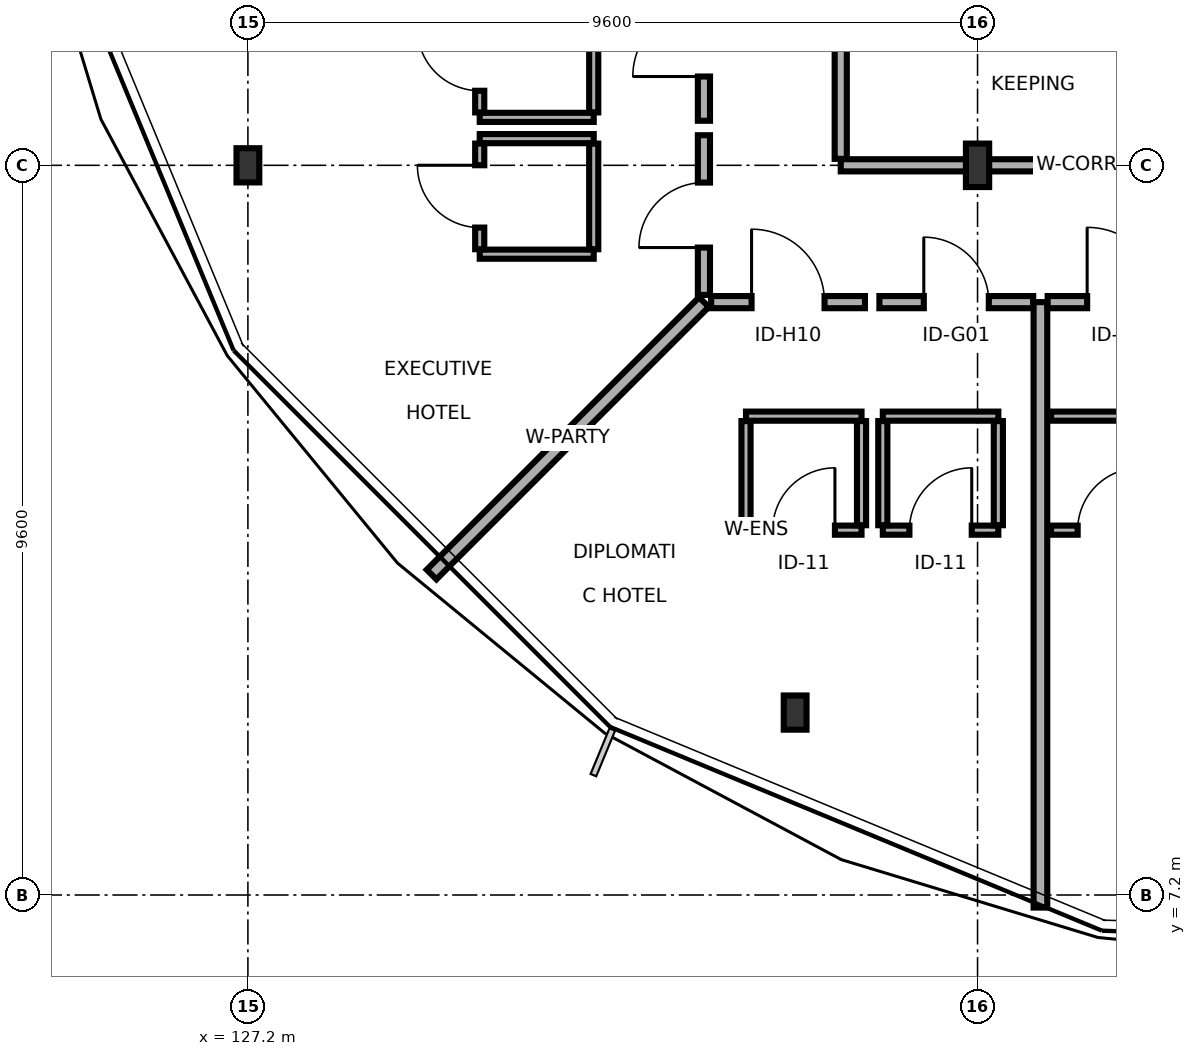
"""IFC4 building model, lengths in metres.
Left out: names, types, materials, properties, quantities, classifications, styles, units other than length and angle.
Written with IfcOpenShell. Run it as: python <this file> out.ifc"""

import sys

from ifc_helpers import new_model, si_unit, direction, frame, frame_2d, origin, origin_2d, place, context, subcontext, project, spatial, rectangle, i_section, extrude, element, fill, save


model = new_model("IFC4")
c1 = context("Model", 3, precision=1e-05, world=origin(), true_north=direction((0.0, 1.0)))
c2 = subcontext(c1, "Body", "Model", "MODEL_VIEW")
j1 = project(units=[si_unit("LENGTHUNIT", "METRE"), si_unit("PLANEANGLEUNIT", "RADIAN")], contexts=[c1])
p1 = place(None, origin())
s1 = spatial("IfcSite", under=j1, at=p1, CompositionType="ELEMENT")
p2 = place(p1, origin())
s2 = spatial("IfcBuilding", under=s1, at=p2, CompositionType="ELEMENT")
p3 = place(p2, frame((0.0, 0.0, 28.3)))
s3 = spatial("IfcBuildingStorey", under=s2, at=p3, CompositionType="ELEMENT", Elevation=28.3)
p4 = place(p3, frame((136.8, 16.8, 0.0), z_axis=(0.0, 0.0, 1.0), x_axis=(1.0, 0.0, 0.0)))
e1 = element("IfcColumn", 1, at=p4, inside=s3, PredefinedType="COLUMN", context=c2, shape_type="SweptSolid", body=[
    extrude(i_section(OverallWidth=0.306, OverallDepth=0.572, WebThickness=0.021, FlangeThickness=0.04, FilletRadius=0.027, at=origin_2d()), origin(), (0.0, 0.0, 1.0), 3.4),
])
for number, where, z_axis, x_axis in (
    (2, (134.4, 9.6, 0.0), (0.0, 0.0, 1.0), (1.0, 0.0, 0.0)),
    (3, (127.2, 16.8, 0.0), (0.0, 0.0, 1.0), (1.0, 0.0, 0.0)),
):
    element("IfcColumn", number, at=place(p3, frame(where, z_axis=z_axis, x_axis=x_axis)), inside=s3, PredefinedType="COLUMN", context=c2, shape_type="SweptSolid", body=[
        extrude(i_section(OverallWidth=0.3, OverallDepth=0.45, WebThickness=0.014, FlangeThickness=0.026, FilletRadius=0.027, at=origin_2d()), origin(), (0.0, 0.0, 1.0), 3.4),
    ])
p5 = place(p3, frame((135.0, 16.8, 0.0), z_axis=(0.0, 0.0, 1.0), x_axis=(1.0, 0.0, 0.0)))
e4 = element("IfcWall", 4, at=p5, inside=s3, PredefinedType="PARTITIONING", context=c2, shape_type="SweptSolid", body=[
    extrude(rectangle(XDim=5.4, YDim=0.16, at=frame_2d((2.7, 0.0))), origin(), (0.0, 0.0, 1.0), 2.71),
])
p6 = place(p5, frame((3.94, 0.0, 0.0)))
e5 = element("IfcOpeningElement", 5, at=p6, cuts=e4, PredefinedType="OPENING", context=c2, shape_type="SweptSolid", body=[
    extrude(rectangle(XDim=1.3, YDim=2.2, at=frame_2d((0.65, 1.1))), frame((0.0, 0.09, 0.0), z_axis=(0.0, -1.0, 0.0), x_axis=(1.0, 0.0, 0.0)), (0.0, 0.0, 1.0), 0.18),
])
p7 = place(p3, frame((135.0, 16.885, 0.0), z_axis=(0.0, 0.0, 1.0), x_axis=(0.0, 1.0, 0.0)))
e6 = element("IfcWall", 6, at=p7, inside=s3, PredefinedType="PARTITIONING", context=c2, shape_type="SweptSolid", body=[
    extrude(rectangle(XDim=2.48, YDim=0.16, at=frame_2d((1.24, 0.0))), origin(), (0.0, 0.0, 1.0), 2.71),
])
p8 = place(p3, frame((133.295, 15.0, 0.0), z_axis=(0.0, 0.0, 1.0), x_axis=(1.0, 0.0, 0.0)))
e7 = element("IfcWall", 7, at=p8, inside=s3, PredefinedType="PARTITIONING", context=c2, shape_type="SweptSolid", body=[
    extrude(rectangle(XDim=2.024, YDim=0.16, at=frame_2d((1.012, 0.0))), origin(), (0.0, 0.0, 1.0), 3.175),
])
p9 = place(p8, frame((0.532, 0.0, 0.0)))
e8 = element("IfcOpeningElement", 8, at=p9, cuts=e7, PredefinedType="OPENING", context=c2, shape_type="SweptSolid", body=[
    extrude(rectangle(XDim=0.96, YDim=2.13, at=frame_2d((0.48, 1.065))), frame((0.0, 0.09, 0.0), z_axis=(0.0, -1.0, 0.0), x_axis=(1.0, 0.0, 0.0)), (0.0, 0.0, 1.0), 0.18),
])
p10 = place(p3, frame((133.754, 12.0, 0.0), z_axis=(0.0, 0.0, 1.0), x_axis=(1.0, 0.0, 0.0)))
e9 = element("IfcWall", 9, at=p10, inside=s3, PredefinedType="PARTITIONING", context=c2, shape_type="SweptSolid", body=[
    extrude(rectangle(XDim=1.52, YDim=0.12, at=frame_2d((0.76, 0.0))), origin(), (0.0, 0.0, 1.0), 2.71),
])
p11 = place(p10, frame((0.35, 0.0, 0.0)))
e10 = element("IfcOpeningElement", 10, at=p11, cuts=e9, PredefinedType="OPENING", context=c2, shape_type="SweptSolid", body=[
    extrude(rectangle(XDim=0.82, YDim=2.08, at=frame_2d((0.41, 1.04))), frame((0.0, 0.07, 0.0), z_axis=(0.0, -1.0, 0.0), x_axis=(1.0, 0.0, 0.0)), (0.0, 0.0, 1.0), 0.14),
])
p12 = place(p3, frame((133.754, 13.5, 0.0), z_axis=(0.0, 0.0, 1.0), x_axis=(1.0, 0.0, 0.0)))
e11 = element("IfcWall", 11, at=p12, inside=s3, PredefinedType="PARTITIONING", context=c2, shape_type="SweptSolid", body=[
    extrude(rectangle(XDim=1.52, YDim=0.12, at=frame_2d((0.76, 0.0))), origin(), (0.0, 0.0, 1.0), 3.175),
])
p13 = place(p3, frame((133.754, 12.065, 0.0), z_axis=(0.0, 0.0, 1.0), x_axis=(0.0, 1.0, 0.0)))
e12 = element("IfcWall", 12, at=p13, inside=s3, PredefinedType="PARTITIONING", context=c2, shape_type="SweptSolid", body=[
    extrude(rectangle(XDim=1.37, YDim=0.12, at=frame_2d((0.685, 0.0))), origin(), (0.0, 0.0, 1.0), 3.175),
])
p14 = place(p3, frame((135.274, 12.065, 0.0), z_axis=(0.0, 0.0, 1.0), x_axis=(0.0, 1.0, 0.0)))
e13 = element("IfcWall", 13, at=p14, inside=s3, PredefinedType="PARTITIONING", context=c2, shape_type="SweptSolid", body=[
    extrude(rectangle(XDim=1.37, YDim=0.12, at=frame_2d((0.685, 0.0))), origin(), (0.0, 0.0, 1.0), 2.71),
])
p15 = place(p3, frame((133.2, 15.0, 0.0), z_axis=(0.0, 0.0, 1.0), x_axis=(-0.707082692656, -0.707130868897, 0.0)))
e14 = element("IfcWall", 14, at=p15, inside=s3, PredefinedType="PARTITIONING", context=c2, shape_type="SweptSolid", body=[
    extrude(rectangle(XDim=5.068, YDim=0.18, at=frame_2d((2.534, 0.0))), origin(), (0.0, 0.0, 1.0), 2.66),
])
p16 = place(p3, frame((135.509, 15.0, 0.0), z_axis=(0.0, 0.0, 1.0), x_axis=(1.0, 0.0, 0.0)))
e15 = element("IfcWall", 15, at=p16, inside=s3, PredefinedType="PARTITIONING", context=c2, shape_type="SweptSolid", body=[
    extrude(rectangle(XDim=2.024, YDim=0.16, at=frame_2d((1.012, 0.0))), origin(), (0.0, 0.0, 1.0), 2.71),
])
p17 = place(p16, frame((0.584, 0.0, 0.0)))
e16 = element("IfcOpeningElement", 16, at=p17, cuts=e15, PredefinedType="OPENING", context=c2, shape_type="SweptSolid", body=[
    extrude(rectangle(XDim=0.855, YDim=2.05, at=frame_2d((0.427, 1.025))), frame((0.0, 0.09, 0.0), z_axis=(0.0, -1.0, 0.0), x_axis=(1.0, 0.0, 0.0)), (0.0, 0.0, 1.0), 0.18),
])
p18 = place(p3, frame((135.554, 12.0, 0.0), z_axis=(0.0, 0.0, 1.0), x_axis=(1.0, 0.0, 0.0)))
e17 = element("IfcWall", 17, at=p18, inside=s3, PredefinedType="PARTITIONING", context=c2, shape_type="SweptSolid", body=[
    extrude(rectangle(XDim=1.52, YDim=0.12, at=frame_2d((0.76, 0.0))), origin(), (0.0, 0.0, 1.0), 3.175),
])
p19 = place(p18, frame((0.35, 0.0, 0.0)))
e18 = element("IfcOpeningElement", 18, at=p19, cuts=e17, PredefinedType="OPENING", context=c2, shape_type="SweptSolid", body=[
    extrude(rectangle(XDim=0.82, YDim=2.08, at=frame_2d((0.41, 1.04))), frame((0.0, 0.07, 0.0), z_axis=(0.0, -1.0, 0.0), x_axis=(1.0, 0.0, 0.0)), (0.0, 0.0, 1.0), 0.14),
])
p20 = place(p3, frame((135.554, 13.5, 0.0), z_axis=(0.0, 0.0, 1.0), x_axis=(1.0, 0.0, 0.0)))
e19 = element("IfcWall", 19, at=p20, inside=s3, PredefinedType="PARTITIONING", context=c2, shape_type="SweptSolid", body=[
    extrude(rectangle(XDim=1.52, YDim=0.12, at=frame_2d((0.76, 0.0))), origin(), (0.0, 0.0, 1.0), 2.71),
])
p21 = place(p3, frame((135.554, 12.065, 0.0), z_axis=(0.0, 0.0, 1.0), x_axis=(0.0, 1.0, 0.0)))
e20 = element("IfcWall", 20, at=p21, inside=s3, PredefinedType="PARTITIONING", context=c2, shape_type="SweptSolid", body=[
    extrude(rectangle(XDim=1.37, YDim=0.12, at=frame_2d((0.685, 0.0))), origin(), (0.0, 0.0, 1.0), 2.71),
])
p22 = place(p3, frame((137.073, 12.065, 0.0), z_axis=(0.0, 0.0, 1.0), x_axis=(0.0, 1.0, 0.0)))
e21 = element("IfcWall", 21, at=p22, inside=s3, PredefinedType="PARTITIONING", context=c2, shape_type="SweptSolid", body=[
    extrude(rectangle(XDim=1.37, YDim=0.12, at=frame_2d((0.685, 0.0))), origin(), (0.0, 0.0, 1.0), 3.175),
])
p23 = place(p3, frame((137.627, 7.035, 0.0), z_axis=(0.0, 0.0, 1.0), x_axis=(0.0, 1.0, 0.0)))
e22 = element("IfcWall", 22, at=p23, inside=s3, PredefinedType="PARTITIONING", context=c2, shape_type="SweptSolid", body=[
    extrude(rectangle(XDim=7.965, YDim=0.18, at=frame_2d((3.982, 0.0))), origin(), (0.0, 0.0, 1.0), 2.66),
])
p24 = place(p3, frame((137.722, 15.0, 0.0), z_axis=(0.0, 0.0, 1.0), x_axis=(1.0, 0.0, 0.0)))
e23 = element("IfcWall", 23, at=p24, inside=s3, PredefinedType="PARTITIONING", context=c2, shape_type="SweptSolid", body=[
    extrude(rectangle(XDim=2.023, YDim=0.16, at=frame_2d((1.012, 0.0))), origin(), (0.0, 0.0, 1.0), 3.175),
])
p25 = place(p24, frame((0.52, 0.0, 0.0)))
e24 = element("IfcOpeningElement", 24, at=p25, cuts=e23, PredefinedType="OPENING", context=c2, shape_type="SweptSolid", body=[
    extrude(rectangle(XDim=0.984, YDim=2.07, at=frame_2d((0.492, 1.035))), frame((0.0, 0.09, 0.0), z_axis=(0.0, -1.0, 0.0), x_axis=(1.0, 0.0, 0.0)), (0.0, 0.0, 1.0), 0.18),
])
p26 = place(p3, frame((137.767, 12.0, 0.0), z_axis=(0.0, 0.0, 1.0), x_axis=(1.0, 0.0, 0.0)))
e25 = element("IfcWall", 25, at=p26, inside=s3, PredefinedType="PARTITIONING", context=c2, shape_type="SweptSolid", body=[
    extrude(rectangle(XDim=1.52, YDim=0.12, at=frame_2d((0.76, 0.0))), origin(), (0.0, 0.0, 1.0), 3.175),
])
p27 = place(p26, frame((0.35, 0.0, 0.0)))
e26 = element("IfcOpeningElement", 26, at=p27, cuts=e25, PredefinedType="OPENING", context=c2, shape_type="SweptSolid", body=[
    extrude(rectangle(XDim=0.82, YDim=2.08, at=frame_2d((0.41, 1.04))), frame((0.0, 0.07, 0.0), z_axis=(0.0, -1.0, 0.0), x_axis=(1.0, 0.0, 0.0)), (0.0, 0.0, 1.0), 0.14),
])
p28 = place(p3, frame((137.767, 13.5, 0.0), z_axis=(0.0, 0.0, 1.0), x_axis=(1.0, 0.0, 0.0)))
e27 = element("IfcWall", 27, at=p28, inside=s3, PredefinedType="PARTITIONING", context=c2, shape_type="SweptSolid", body=[
    extrude(rectangle(XDim=1.52, YDim=0.12, at=frame_2d((0.76, 0.0))), origin(), (0.0, 0.0, 1.0), 3.175),
])
p29 = place(p3, frame((133.2, 17.386, 0.0), z_axis=(0.0, 0.0, 1.0), x_axis=(0.0, 1.0, 0.0)))
e28 = element("IfcWall", 28, at=p29, inside=s3, PredefinedType="PARTITIONING", context=c2, shape_type="SweptSolid", body=[
    extrude(rectangle(XDim=2.101, YDim=0.16, at=frame_2d((1.05, 0.0))), origin(), (0.0, 0.0, 1.0), 3.175),
])
p30 = place(p29, frame((0.583, 0.0, 0.0)))
e29 = element("IfcOpeningElement", 29, at=p30, cuts=e28, PredefinedType="OPENING", context=c2, shape_type="SweptSolid", body=[
    extrude(rectangle(XDim=0.936, YDim=2.07, at=frame_2d((0.468, 1.035))), frame((0.0, 0.09, 0.0), z_axis=(0.0, -1.0, 0.0), x_axis=(1.0, 0.0, 0.0)), (0.0, 0.0, 1.0), 0.18),
])
p31 = place(p3, frame((130.25, 17.431, 0.0), z_axis=(0.0, 0.0, 1.0), x_axis=(1.0, 0.0, 0.0)))
e30 = element("IfcWall", 30, at=p31, inside=s3, PredefinedType="PARTITIONING", context=c2, shape_type="SweptSolid", body=[
    extrude(rectangle(XDim=1.5, YDim=0.12, at=frame_2d((0.75, 0.0))), origin(), (0.0, 0.0, 1.0), 3.175),
])
p32 = place(p3, frame((130.25, 17.496, 0.0), z_axis=(0.0, 0.0, 1.0), x_axis=(0.0, 1.0, 0.0)))
e31 = element("IfcWall", 31, at=p32, inside=s3, PredefinedType="PARTITIONING", context=c2, shape_type="SweptSolid", body=[
    extrude(rectangle(XDim=1.39, YDim=0.12, at=frame_2d((0.695, 0.0))), origin(), (0.0, 0.0, 1.0), 3.175),
])
p33 = place(p32, frame((0.285, 0.0, 0.0)))
e32 = element("IfcOpeningElement", 32, at=p33, cuts=e31, PredefinedType="OPENING", context=c2, shape_type="SweptSolid", body=[
    extrude(rectangle(XDim=0.82, YDim=2.08, at=frame_2d((0.41, 1.04))), frame((0.0, 0.07, 0.0), z_axis=(0.0, -1.0, 0.0), x_axis=(1.0, 0.0, 0.0)), (0.0, 0.0, 1.0), 0.14),
])
p34 = place(p3, frame((131.75, 17.496, 0.0), z_axis=(0.0, 0.0, 1.0), x_axis=(0.0, 1.0, 0.0)))
e33 = element("IfcWall", 33, at=p34, inside=s3, PredefinedType="PARTITIONING", context=c2, shape_type="SweptSolid", body=[
    extrude(rectangle(XDim=1.39, YDim=0.12, at=frame_2d((0.695, 0.0))), origin(), (0.0, 0.0, 1.0), 3.175),
])
p35 = place(p3, frame((133.2, 15.095, 0.0), z_axis=(0.0, 0.0, 1.0), x_axis=(0.0, 1.0, 0.0)))
e34 = element("IfcWall", 34, at=p35, inside=s3, PredefinedType="PARTITIONING", context=c2, shape_type="SweptSolid", body=[
    extrude(rectangle(XDim=2.101, YDim=0.16, at=frame_2d((1.05, 0.0))), origin(), (0.0, 0.0, 1.0), 2.71),
])
p36 = place(p35, frame((0.623, 0.0, 0.0)))
e35 = element("IfcOpeningElement", 35, at=p36, cuts=e34, PredefinedType="OPENING", context=c2, shape_type="SweptSolid", body=[
    extrude(rectangle(XDim=0.855, YDim=2.05, at=frame_2d((0.427, 1.025))), frame((0.0, 0.09, 0.0), z_axis=(0.0, -1.0, 0.0), x_axis=(1.0, 0.0, 0.0)), (0.0, 0.0, 1.0), 0.18),
])
for number, where, z_axis, x_axis in (
    (36, (130.25, 15.631, 0.0), (0.0, 0.0, 1.0), (1.0, 0.0, 0.0)),
    (37, (130.25, 17.151, 0.0), (0.0, 0.0, 1.0), (1.0, 0.0, 0.0)),
):
    element("IfcWall", number, at=place(p3, frame(where, z_axis=z_axis, x_axis=x_axis)), inside=s3, PredefinedType="PARTITIONING", context=c2, shape_type="SweptSolid", body=[
        extrude(rectangle(XDim=1.5, YDim=0.12, at=frame_2d((0.75, 0.0))), origin(), (0.0, 0.0, 1.0), 3.175),
    ])
p37 = place(p3, frame((130.25, 15.696, 0.0), z_axis=(0.0, 0.0, 1.0), x_axis=(0.0, 1.0, 0.0)))
e38 = element("IfcWall", 38, at=p37, inside=s3, PredefinedType="PARTITIONING", context=c2, shape_type="SweptSolid", body=[
    extrude(rectangle(XDim=1.39, YDim=0.12, at=frame_2d((0.695, 0.0))), origin(), (0.0, 0.0, 1.0), 2.71),
])
p38 = place(p37, frame((0.285, 0.0, 0.0)))
e39 = element("IfcOpeningElement", 39, at=p38, cuts=e38, PredefinedType="OPENING", context=c2, shape_type="SweptSolid", body=[
    extrude(rectangle(XDim=0.82, YDim=2.08, at=frame_2d((0.41, 1.04))), frame((0.0, 0.07, 0.0), z_axis=(0.0, -1.0, 0.0), x_axis=(1.0, 0.0, 0.0)), (0.0, 0.0, 1.0), 0.14),
])
p39 = place(p3, frame((131.75, 15.696, 0.0), z_axis=(0.0, 0.0, 1.0), x_axis=(0.0, 1.0, 0.0)))
e40 = element("IfcWall", 40, at=p39, inside=s3, PredefinedType="PARTITIONING", context=c2, shape_type="SweptSolid", body=[
    extrude(rectangle(XDim=1.39, YDim=0.12, at=frame_2d((0.695, 0.0))), origin(), (0.0, 0.0, 1.0), 2.71),
])
p40 = place(p9, origin())
e41 = element("IfcDoor", 41, at=p40, inside=s3, OperationType="SINGLE_SWING_LEFT", PredefinedType="DOOR", context=c2, shape_type="SweptSolid", body=[
    extrude(rectangle(XDim=0.96, YDim=2.13, at=frame_2d((0.48, 1.065))), frame((0.0, 0.025, 0.0), z_axis=(0.0, -1.0, 0.0), x_axis=(1.0, 0.0, 0.0)), (0.0, 0.0, 1.0), 0.05),
])
fill(e8, e41)
p41 = place(p11, origin())
e42 = element("IfcDoor", 42, at=p41, inside=s3, OperationType="SINGLE_SWING_RIGHT", PredefinedType="DOOR", context=c2, shape_type="SweptSolid", body=[
    extrude(rectangle(XDim=0.82, YDim=2.08, at=frame_2d((0.41, 1.04))), frame((0.0, 0.025, 0.0), z_axis=(0.0, -1.0, 0.0), x_axis=(1.0, 0.0, 0.0)), (0.0, 0.0, 1.0), 0.05),
])
fill(e10, e42)
p42 = place(p17, origin())
e43 = element("IfcDoor", 43, at=p42, inside=s3, OperationType="SINGLE_SWING_LEFT", PredefinedType="DOOR", context=c2, shape_type="SweptSolid", body=[
    extrude(rectangle(XDim=0.855, YDim=2.05, at=frame_2d((0.427, 1.025))), frame((0.0, 0.025, 0.0), z_axis=(0.0, -1.0, 0.0), x_axis=(1.0, 0.0, 0.0)), (0.0, 0.0, 1.0), 0.05),
])
fill(e16, e43)
p43 = place(p19, origin())
e44 = element("IfcDoor", 44, at=p43, inside=s3, OperationType="SINGLE_SWING_RIGHT", PredefinedType="DOOR", context=c2, shape_type="SweptSolid", body=[
    extrude(rectangle(XDim=0.82, YDim=2.08, at=frame_2d((0.41, 1.04))), frame((0.0, 0.025, 0.0), z_axis=(0.0, -1.0, 0.0), x_axis=(1.0, 0.0, 0.0)), (0.0, 0.0, 1.0), 0.05),
])
fill(e18, e44)
p44 = place(p25, origin())
e45 = element("IfcDoor", 45, at=p44, inside=s3, OperationType="SINGLE_SWING_LEFT", PredefinedType="DOOR", context=c2, shape_type="SweptSolid", body=[
    extrude(rectangle(XDim=0.984, YDim=2.07, at=frame_2d((0.492, 1.035))), frame((0.0, 0.025, 0.0), z_axis=(0.0, -1.0, 0.0), x_axis=(1.0, 0.0, 0.0)), (0.0, 0.0, 1.0), 0.05),
])
fill(e24, e45)
p45 = place(p27, origin())
e46 = element("IfcDoor", 46, at=p45, inside=s3, OperationType="SINGLE_SWING_RIGHT", PredefinedType="DOOR", context=c2, shape_type="SweptSolid", body=[
    extrude(rectangle(XDim=0.82, YDim=2.08, at=frame_2d((0.41, 1.04))), frame((0.0, 0.025, 0.0), z_axis=(0.0, -1.0, 0.0), x_axis=(1.0, 0.0, 0.0)), (0.0, 0.0, 1.0), 0.05),
])
fill(e26, e46)
p46 = place(p30, origin())
e47 = element("IfcDoor", 47, at=p46, inside=s3, OperationType="SINGLE_SWING_LEFT", PredefinedType="DOOR", context=c2, shape_type="SweptSolid", body=[
    extrude(rectangle(XDim=0.936, YDim=2.07, at=frame_2d((0.468, 1.035))), frame((0.0, 0.025, 0.0), z_axis=(0.0, -1.0, 0.0), x_axis=(1.0, 0.0, 0.0)), (0.0, 0.0, 1.0), 0.05),
])
fill(e29, e47)
p47 = place(p33, origin())
e48 = element("IfcDoor", 48, at=p47, inside=s3, OperationType="SINGLE_SWING_RIGHT", PredefinedType="DOOR", context=c2, shape_type="SweptSolid", body=[
    extrude(rectangle(XDim=0.82, YDim=2.08, at=frame_2d((0.41, 1.04))), frame((0.0, 0.025, 0.0), z_axis=(0.0, -1.0, 0.0), x_axis=(1.0, 0.0, 0.0)), (0.0, 0.0, 1.0), 0.05),
])
fill(e32, e48)
p48 = place(p36, origin())
e49 = element("IfcDoor", 49, at=p48, inside=s3, OperationType="SINGLE_SWING_LEFT", PredefinedType="DOOR", context=c2, shape_type="SweptSolid", body=[
    extrude(rectangle(XDim=0.855, YDim=2.05, at=frame_2d((0.427, 1.025))), frame((0.0, 0.025, 0.0), z_axis=(0.0, -1.0, 0.0), x_axis=(1.0, 0.0, 0.0)), (0.0, 0.0, 1.0), 0.05),
])
fill(e35, e49)
p49 = place(p38, origin())
e50 = element("IfcDoor", 50, at=p49, inside=s3, OperationType="SINGLE_SWING_RIGHT", PredefinedType="DOOR", context=c2, shape_type="SweptSolid", body=[
    extrude(rectangle(XDim=0.82, YDim=2.08, at=frame_2d((0.41, 1.04))), frame((0.0, 0.025, 0.0), z_axis=(0.0, -1.0, 0.0), x_axis=(1.0, 0.0, 0.0)), (0.0, 0.0, 1.0), 0.05),
])
fill(e39, e50)
save(model, sys.argv[1])
